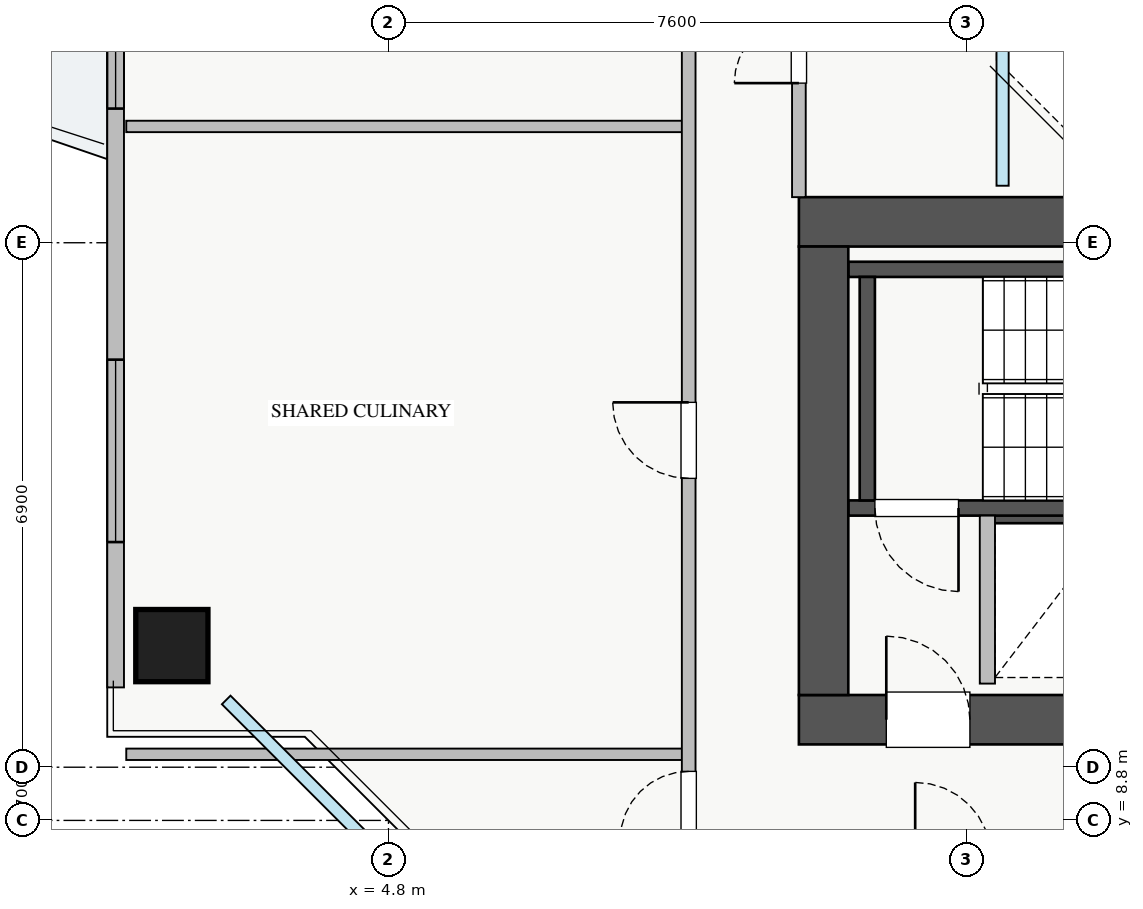
"""IFC4 building model, lengths in metres.
Left out: names, types, materials, properties, quantities, classifications, styles, units other than length and angle.
Written with IfcOpenShell. Run it as: python <this file> out.ifc"""

import sys

from ifc_helpers import new_model, si_unit, direction, frame, frame_2d, origin, origin_2d, place, context, subcontext, project, spatial, rectangle, extrude, source, transform, mapped, element, fill, save


model = new_model("IFC4")
c1 = context("Model", 3, precision=1e-05, world=origin(), true_north=direction((0.0, 1.0)))
c2 = subcontext(c1, "Body", "Model", "MODEL_VIEW")
j1 = project(units=[si_unit("LENGTHUNIT", "METRE"), si_unit("PLANEANGLEUNIT", "RADIAN")], contexts=[c1])
p1 = place(None, origin())
s1 = spatial("IfcSite", under=j1, at=p1, CompositionType="ELEMENT")
p2 = place(p1, origin())
s2 = spatial("IfcBuilding", under=s1, at=p2, CompositionType="ELEMENT")
p3 = place(p2, frame((0.0, 0.0, 143.75)))
s3 = spatial("IfcBuildingStorey", under=s2, at=p3, CompositionType="ELEMENT", Elevation=143.75)
p4 = place(p3, frame((12.68, 12.8, 0.0), z_axis=(0.0, 0.0, 1.0), x_axis=(1.0, 0.0, 0.0)))
e1 = element("IfcWall", 1, at=p4, inside=s3, PredefinedType="SHEAR", context=c2, shape_type="SweptSolid", body=[
    extrude(rectangle(XDim=1.94, YDim=0.18, at=frame_2d((0.97, 0.0))), origin(), (0.0, 0.0, 1.0), 3.07),
])
p5 = place(p3, frame((10.85, 12.91, 0.0), z_axis=(0.0, 0.0, 1.0), x_axis=(1.0, 0.0, 0.0)))
e2 = element("IfcWall", 2, at=p5, inside=s3, PredefinedType="SHEAR", context=c2, shape_type="SweptSolid", body=[
    extrude(rectangle(XDim=7.3, YDim=0.2, at=frame_2d((3.65, 0.0))), origin(), (0.0, 0.0, 1.0), 3.25),
])
p6 = place(p5, frame((0.35, 0.0, 0.0)))
e3 = element("IfcOpeningElement", 3, at=p6, cuts=e2, PredefinedType="OPENING", context=c2, shape_type="SweptSolid", body=[
    extrude(rectangle(XDim=1.1, YDim=2.05, at=frame_2d((0.55, 1.025))), frame((0.0, 0.11, 0.0), z_axis=(0.0, -1.0, 0.0), x_axis=(1.0, 0.0, 0.0)), (0.0, 0.0, 1.0), 0.22),
])
p7 = place(p3, frame((10.85, 16.05, 0.0), z_axis=(0.0, 0.0, 1.0), x_axis=(1.0, 0.0, 0.0)))
e4 = element("IfcWall", 4, at=p7, inside=s3, PredefinedType="SHEAR", context=c2, shape_type="SweptSolid", body=[
    extrude(rectangle(XDim=7.3, YDim=0.2, at=frame_2d((3.65, 0.0))), origin(), (0.0, 0.0, 1.0), 3.25),
])
p8 = place(p3, frame((11.1, 13.01, 0.0), z_axis=(0.0, 0.0, 1.0), x_axis=(0.0, 1.0, 0.0)))
e5 = element("IfcWall", 5, at=p8, inside=s3, PredefinedType="SHEAR", context=c2, shape_type="SweptSolid", body=[
    extrude(rectangle(XDim=2.94, YDim=0.2, at=frame_2d((1.47, 0.0))), origin(), (0.0, 0.0, 1.0), 3.25),
])
p9 = place(p3, frame((10.2, 10.125, 0.0), z_axis=(0.0, 0.0, 1.0), x_axis=(1.0, 0.0, 0.0)))
e6 = element("IfcWall", 6, at=p9, inside=s3, PredefinedType="SHEAR", context=c2, shape_type="SweptSolid", body=[
    extrude(rectangle(XDim=17.6, YDim=0.65, at=frame_2d((8.8, 0.0))), origin(), (0.0, 0.0, 1.0), 3.25),
])
p10 = place(p9, frame((1.15, 0.0, 0.0)))
e7 = element("IfcOpeningElement", 7, at=p10, cuts=e6, PredefinedType="OPENING", context=c2, shape_type="SweptSolid", body=[
    extrude(rectangle(XDim=1.1, YDim=2.05, at=frame_2d((0.55, 1.025))), frame((0.0, 0.335, 0.0), z_axis=(0.0, -1.0, 0.0), x_axis=(1.0, 0.0, 0.0)), (0.0, 0.0, 1.0), 0.67),
])
p11 = place(p9, frame((8.3, 0.0, 0.0)))
e8 = element("IfcOpeningElement", 8, at=p11, cuts=e6, PredefinedType="OPENING", context=c2, shape_type="SweptSolid", body=[
    extrude(rectangle(XDim=1.1, YDim=2.05, at=frame_2d((0.55, 1.025))), frame((0.0, 0.335, 0.0), z_axis=(0.0, -1.0, 0.0), x_axis=(1.0, 0.0, 0.0)), (0.0, 0.0, 1.0), 0.67),
])
p12 = place(p9, frame((4.9, 0.0, 0.0)))
e9 = element("IfcOpeningElement", 9, at=p12, cuts=e6, PredefinedType="OPENING", context=c2, shape_type="SweptSolid", body=[
    extrude(rectangle(XDim=1.1, YDim=2.05, at=frame_2d((0.55, 1.025))), frame((0.0, 0.335, 0.0), z_axis=(0.0, -1.0, 0.0), x_axis=(1.0, 0.0, 0.0)), (0.0, 0.0, 1.0), 0.67),
])
p13 = place(p9, frame((14.74, 0.0, 0.0)))
e10 = element("IfcOpeningElement", 10, at=p13, cuts=e6, PredefinedType="OPENING", context=c2, shape_type="SweptSolid", body=[
    extrude(rectangle(XDim=1.0, YDim=2.05, at=frame_2d((0.5, 1.025))), frame((0.0, 0.335, 0.0), z_axis=(0.0, -1.0, 0.0), x_axis=(1.0, 0.0, 0.0)), (0.0, 0.0, 1.0), 0.67),
])
p14 = place(p9, frame((10.155, 0.0, 0.0)))
e11 = element("IfcOpeningElement", 11, at=p14, cuts=e6, PredefinedType="OPENING", context=c2, shape_type="SweptSolid", body=[
    extrude(rectangle(XDim=1.0, YDim=2.05, at=frame_2d((0.5, 1.025))), frame((0.0, 0.335, 0.0), z_axis=(0.0, -1.0, 0.0), x_axis=(1.0, 0.0, 0.0)), (0.0, 0.0, 1.0), 0.67),
])
p15 = place(p9, frame((11.87, 0.0, 0.0)))
e12 = element("IfcOpeningElement", 12, at=p15, cuts=e6, PredefinedType="OPENING", context=c2, shape_type="SweptSolid", body=[
    extrude(rectangle(XDim=1.0, YDim=2.05, at=frame_2d((0.5, 1.025))), frame((0.0, 0.335, 0.0), z_axis=(0.0, -1.0, 0.0), x_axis=(1.0, 0.0, 0.0)), (0.0, 0.0, 1.0), 0.67),
])
p16 = place(p9, frame((13.46, 0.0, 0.0)))
e13 = element("IfcOpeningElement", 13, at=p16, cuts=e6, PredefinedType="OPENING", context=c2, shape_type="SweptSolid", body=[
    extrude(rectangle(XDim=1.0, YDim=2.05, at=frame_2d((0.5, 1.025))), frame((0.0, 0.335, 0.0), z_axis=(0.0, -1.0, 0.0), x_axis=(1.0, 0.0, 0.0)), (0.0, 0.0, 1.0), 0.67),
])
p17 = place(p3, frame((10.2, 16.675, 0.0), z_axis=(0.0, 0.0, 1.0), x_axis=(1.0, 0.0, 0.0)))
e14 = element("IfcWall", 14, at=p17, inside=s3, PredefinedType="SHEAR", context=c2, shape_type="SweptSolid", body=[
    extrude(rectangle(XDim=17.6, YDim=0.65, at=frame_2d((8.8, 0.0))), origin(), (0.0, 0.0, 1.0), 3.25),
])
p18 = place(p3, frame((10.525, 10.45, 0.0), z_axis=(0.0, 0.0, 1.0), x_axis=(0.0, 1.0, 0.0)))
e15 = element("IfcWall", 15, at=p18, inside=s3, PredefinedType="SHEAR", context=c2, shape_type="SweptSolid", body=[
    extrude(rectangle(XDim=5.9, YDim=0.65, at=frame_2d((2.95, 0.0))), origin(), (0.0, 0.0, 1.0), 3.25),
])
m1 = source(origin(), c2, "Body", "SweptSolid", [
    extrude(rectangle(XDim=0.95, YDim=0.95, at=origin_2d()), origin(), (0.0, 0.0, 1.0), 3.25),
])
p19 = place(p3, frame((1.95, 11.1, 0.0), z_axis=(0.0, 0.0, 1.0), x_axis=(1.0, 0.0, 0.0)))
e16 = element("IfcColumn", 16, at=p19, inside=s3, PredefinedType="COLUMN", context=c2, shape_type="MappedRepresentation", body=[
    mapped(m1, transform((0.0, 0.0, 0.0), x_axis=(1.0, 0.0, 0.0), y_axis=(0.0, 1.0, 0.0), z_axis=(0.0, 0.0, 1.0), scale=1.0)),
])
p20 = place(p3, frame((1.21, 10.55, 0.0), z_axis=(0.0, 0.0, 1.0), x_axis=(0.0, 1.0, 0.0)))
e17 = element("IfcWall", 17, at=p20, inside=s3, PredefinedType="STANDARD", context=c2, shape_type="SweptSolid", body=[
    extrude(rectangle(XDim=24.9, YDim=0.22, at=frame_2d((12.45, 0.0))), origin(), (0.0, 0.0, 1.0), 2.61),
])
p21 = place(p20, frame((13.3, 0.0, 0.0)))
e18 = element("IfcOpeningElement", 18, at=p21, cuts=e17, PredefinedType="OPENING", context=c2, shape_type="SweptSolid", body=[
    extrude(rectangle(XDim=1.2, YDim=2.1, at=frame_2d((0.6, 1.05))), frame((0.0, 0.12, 0.0), z_axis=(0.0, -1.0, 0.0), x_axis=(1.0, 0.0, 0.0)), (0.0, 0.0, 1.0), 0.24),
])
p22 = place(p20, frame((1.912, 0.0, 0.9)))
e19 = element("IfcOpeningElement", 19, at=p22, cuts=e17, PredefinedType="OPENING", context=c2, shape_type="SweptSolid", body=[
    extrude(rectangle(XDim=2.4, YDim=1.48, at=frame_2d((1.2, 0.74))), frame((0.0, 0.12, 0.0), z_axis=(0.0, -1.0, 0.0), x_axis=(1.0, 0.0, 0.0)), (0.0, 0.0, 1.0), 0.24),
])
p23 = place(p20, frame((21.82, 0.0, 0.9)))
e20 = element("IfcOpeningElement", 20, at=p23, cuts=e17, PredefinedType="OPENING", context=c2, shape_type="SweptSolid", body=[
    extrude(rectangle(XDim=2.1, YDim=1.5, at=frame_2d((1.05, 0.75))), frame((0.0, 0.12, 0.0), z_axis=(0.0, -1.0, 0.0), x_axis=(1.0, 0.0, 0.0)), (0.0, 0.0, 1.0), 0.24),
])
p24 = place(p20, frame((12.05, 0.0, 0.9)))
e21 = element("IfcOpeningElement", 21, at=p24, cuts=e17, PredefinedType="OPENING", context=c2, shape_type="SweptSolid", body=[
    extrude(rectangle(XDim=0.9, YDim=1.2, at=frame_2d((0.45, 0.6))), frame((0.0, 0.12, 0.0), z_axis=(0.0, -1.0, 0.0), x_axis=(1.0, 0.0, 0.0)), (0.0, 0.0, 1.0), 0.24),
])
p25 = place(p20, frame((7.615, 0.0, 0.9)))
e22 = element("IfcOpeningElement", 22, at=p25, cuts=e17, PredefinedType="OPENING", context=c2, shape_type="SweptSolid", body=[
    extrude(rectangle(XDim=0.9, YDim=1.2, at=frame_2d((0.45, 0.6))), frame((0.0, 0.12, 0.0), z_axis=(0.0, -1.0, 0.0), x_axis=(1.0, 0.0, 0.0)), (0.0, 0.0, 1.0), 0.24),
])
p26 = place(p20, frame((16.895, 0.0, 0.9)))
e23 = element("IfcOpeningElement", 23, at=p26, cuts=e17, PredefinedType="OPENING", context=c2, shape_type="SweptSolid", body=[
    extrude(rectangle(XDim=0.9, YDim=1.2, at=frame_2d((0.45, 0.6))), frame((0.0, 0.12, 0.0), z_axis=(0.0, -1.0, 0.0), x_axis=(1.0, 0.0, 0.0)), (0.0, 0.0, 1.0), 0.24),
])
p27 = place(p3, frame((12.68, 10.6, 0.0), z_axis=(0.0, 0.0, 1.0), x_axis=(0.0, 1.0, 0.0)))
e24 = element("IfcWall", 24, at=p27, inside=s3, PredefinedType="PARTITIONING", context=c2, shape_type="SweptSolid", body=[
    extrude(rectangle(XDim=2.21, YDim=0.2, at=frame_2d((1.105, 0.0))), origin(), (0.0, 0.0, 1.0), 3.07),
])
for number, where, z_axis, x_axis in (
    (25, (1.35, 9.67, 0.0), (0.0, 0.0, 1.0), (1.0, 0.0, 0.0)),
    (26, (1.35, 17.93, 0.0), (0.0, 0.0, 1.0), (1.0, 0.0, 0.0)),
):
    element("IfcWall", number, at=place(p3, frame(where, z_axis=z_axis, x_axis=x_axis)), inside=s3, PredefinedType="PARTITIONING", context=c2, shape_type="SweptSolid", body=[
        extrude(rectangle(XDim=7.4, YDim=0.15, at=frame_2d((3.7, 0.0))), origin(), (0.0, 0.0, 1.0), 3.07),
    ])
p28 = place(p3, frame((8.75, 8.3, 0.0), z_axis=(0.0, 0.0, 1.0), x_axis=(0.0, 1.0, 0.0)))
e27 = element("IfcWall", 27, at=p28, inside=s3, PredefinedType="PARTITIONING", context=c2, shape_type="SweptSolid", body=[
    extrude(rectangle(XDim=29.4, YDim=0.18, at=frame_2d((14.7, 0.0))), origin(), (0.0, 0.0, 1.0), 3.07),
])
p29 = place(p28, frame((28.08, 0.0, 0.0)))
e28 = element("IfcOpeningElement", 28, at=p29, cuts=e27, PredefinedType="OPENING", context=c2, shape_type="SweptSolid", body=[
    extrude(rectangle(XDim=0.9, YDim=2.05, at=frame_2d((0.45, 1.025))), frame((0.0, 0.1, 0.0), z_axis=(0.0, -1.0, 0.0), x_axis=(1.0, 0.0, 0.0)), (0.0, 0.0, 1.0), 0.2),
])
p30 = place(p28, frame((0.245, 0.0, 0.0)))
e29 = element("IfcOpeningElement", 29, at=p30, cuts=e27, PredefinedType="OPENING", context=c2, shape_type="SweptSolid", body=[
    extrude(rectangle(XDim=0.9, YDim=2.05, at=frame_2d((0.45, 1.025))), frame((0.0, 0.1, 0.0), z_axis=(0.0, -1.0, 0.0), x_axis=(1.0, 0.0, 0.0)), (0.0, 0.0, 1.0), 0.2),
])
p31 = place(p28, frame((5.0, 0.0, 0.0)))
e30 = element("IfcOpeningElement", 30, at=p31, cuts=e27, PredefinedType="OPENING", context=c2, shape_type="SweptSolid", body=[
    extrude(rectangle(XDim=1.0, YDim=2.05, at=frame_2d((0.5, 1.025))), frame((0.0, 0.1, 0.0), z_axis=(0.0, -1.0, 0.0), x_axis=(1.0, 0.0, 0.0)), (0.0, 0.0, 1.0), 0.2),
])
p32 = place(p28, frame((11.165, 0.0, 0.0)))
e31 = element("IfcOpeningElement", 31, at=p32, cuts=e27, PredefinedType="OPENING", context=c2, shape_type="SweptSolid", body=[
    extrude(rectangle(XDim=1.0, YDim=2.05, at=frame_2d((0.5, 1.025))), frame((0.0, 0.1, 0.0), z_axis=(0.0, -1.0, 0.0), x_axis=(1.0, 0.0, 0.0)), (0.0, 0.0, 1.0), 0.2),
])
p33 = place(p28, frame((20.325, 0.0, 0.0)))
e32 = element("IfcOpeningElement", 32, at=p33, cuts=e27, PredefinedType="OPENING", context=c2, shape_type="SweptSolid", body=[
    extrude(rectangle(XDim=1.0, YDim=2.05, at=frame_2d((0.5, 1.025))), frame((0.0, 0.1, 0.0), z_axis=(0.0, -1.0, 0.0), x_axis=(1.0, 0.0, 0.0)), (0.0, 0.0, 1.0), 0.2),
])
p34 = place(p3, frame((10.2, 17.0, 0.0), z_axis=(0.0, 0.0, 1.0), x_axis=(0.0, 1.0, 0.0)))
e33 = element("IfcWall", 33, at=p34, inside=s3, PredefinedType="PARTITIONING", context=c2, shape_type="SweptSolid", body=[
    extrude(rectangle(XDim=12.0, YDim=0.18, at=frame_2d((6.0, 0.0))), origin(), (0.0, 0.0, 1.0), 3.07),
])
p35 = place(p34, frame((1.5, 0.0, 0.0)))
e34 = element("IfcOpeningElement", 34, at=p35, cuts=e33, PredefinedType="OPENING", context=c2, shape_type="SweptSolid", body=[
    extrude(rectangle(XDim=0.85, YDim=2.05, at=frame_2d((0.425, 1.025))), frame((0.0, 0.1, 0.0), z_axis=(0.0, -1.0, 0.0), x_axis=(1.0, 0.0, 0.0)), (0.0, 0.0, 1.0), 0.2),
])
p36 = place(p34, frame((6.5, 0.0, 0.0)))
e35 = element("IfcOpeningElement", 35, at=p36, cuts=e33, PredefinedType="OPENING", context=c2, shape_type="SweptSolid", body=[
    extrude(rectangle(XDim=1.0, YDim=2.05, at=frame_2d((0.5, 1.025))), frame((0.0, 0.1, 0.0), z_axis=(0.0, -1.0, 0.0), x_axis=(1.0, 0.0, 0.0)), (0.0, 0.0, 1.0), 0.2),
])
m2 = source(origin(), c2, "Body", "SweptSolid", [
    extrude(rectangle(XDim=2.4, YDim=1.48, at=frame_2d((1.2, 0.74))), frame((0.0, 0.03, 0.0), z_axis=(0.0, -1.0, 0.0), x_axis=(1.0, 0.0, 0.0)), (0.0, 0.0, 1.0), 0.06),
])
p37 = place(p22, origin())
e36 = element("IfcWindow", 36, at=p37, inside=s3, PartitioningType="TRIPLE_PANEL_VERTICAL", PredefinedType="WINDOW", context=c2, shape_type="MappedRepresentation", body=[
    mapped(m2, transform((0.0, 0.0, 0.0), x_axis=(1.0, 0.0, 0.0), y_axis=(0.0, 1.0, 0.0), z_axis=(0.0, 0.0, 1.0), scale=1.0)),
])
fill(e19, e36)
m3 = source(origin(), c2, "Body", "SweptSolid", [
    extrude(rectangle(XDim=1.1, YDim=2.05, at=frame_2d((0.55, 1.025))), frame((0.0, 0.025, 0.0), z_axis=(0.0, -1.0, 0.0), x_axis=(1.0, 0.0, 0.0)), (0.0, 0.0, 1.0), 0.05),
])
p38 = place(p10, origin())
e37 = element("IfcDoor", 37, at=p38, inside=s3, OperationType="SINGLE_SWING_LEFT", PredefinedType="DOOR", context=c2, shape_type="MappedRepresentation", body=[
    mapped(m3, transform((0.0, 0.0, 0.0), x_axis=(1.0, 0.0, 0.0), y_axis=(0.0, 1.0, 0.0), z_axis=(0.0, 0.0, 1.0), scale=1.0)),
])
fill(e7, e37)
p39 = place(p6, frame((1.1, 0.0, 0.0), z_axis=(0.0, 0.0, 1.0), x_axis=(-1.0, 0.0, 0.0)))
e38 = element("IfcDoor", 38, at=p39, inside=s3, OperationType="SINGLE_SWING_RIGHT", PredefinedType="DOOR", context=c2, shape_type="MappedRepresentation", body=[
    mapped(m3, transform((0.0, 0.0, 0.0), x_axis=(1.0, 0.0, 0.0), y_axis=(0.0, 1.0, 0.0), z_axis=(0.0, 0.0, 1.0), scale=1.0)),
])
fill(e3, e38)
m4 = source(origin(), c2, "Body", "SweptSolid", [
    extrude(rectangle(XDim=0.9, YDim=2.05, at=frame_2d((0.45, 1.025))), frame((0.0, 0.025, 0.0), z_axis=(0.0, -1.0, 0.0), x_axis=(1.0, 0.0, 0.0)), (0.0, 0.0, 1.0), 0.05),
])
p40 = place(p30, origin())
e39 = element("IfcDoor", 39, at=p40, inside=s3, OperationType="SINGLE_SWING_LEFT", PredefinedType="DOOR", context=c2, shape_type="MappedRepresentation", body=[
    mapped(m4, transform((0.0, 0.0, 0.0), x_axis=(1.0, 0.0, 0.0), y_axis=(0.0, 1.0, 0.0), z_axis=(0.0, 0.0, 1.0), scale=1.0)),
])
fill(e29, e39)
m5 = source(origin(), c2, "Body", "SweptSolid", [
    extrude(rectangle(XDim=1.0, YDim=2.05, at=frame_2d((0.5, 1.025))), frame((0.0, 0.025, 0.0), z_axis=(0.0, -1.0, 0.0), x_axis=(1.0, 0.0, 0.0)), (0.0, 0.0, 1.0), 0.05),
])
p41 = place(p31, origin())
e40 = element("IfcDoor", 40, at=p41, inside=s3, OperationType="SINGLE_SWING_RIGHT", PredefinedType="DOOR", context=c2, shape_type="MappedRepresentation", body=[
    mapped(m5, transform((0.0, 0.0, 0.0), x_axis=(1.0, 0.0, 0.0), y_axis=(0.0, 1.0, 0.0), z_axis=(0.0, 0.0, 1.0), scale=1.0)),
])
fill(e30, e40)
m6 = source(origin(), c2, "Body", "SweptSolid", [
    extrude(rectangle(XDim=0.85, YDim=2.05, at=frame_2d((0.425, 1.025))), frame((0.0, 0.025, 0.0), z_axis=(0.0, -1.0, 0.0), x_axis=(1.0, 0.0, 0.0)), (0.0, 0.0, 1.0), 0.05),
])
p42 = place(p35, origin())
e41 = element("IfcDoor", 41, at=p42, inside=s3, OperationType="SINGLE_SWING_LEFT", PredefinedType="DOOR", context=c2, shape_type="MappedRepresentation", body=[
    mapped(m6, transform((0.0, 0.0, 0.0), x_axis=(1.0, 0.0, 0.0), y_axis=(0.0, 1.0, 0.0), z_axis=(0.0, 0.0, 1.0), scale=1.0)),
])
fill(e34, e41)
m7 = source(origin(), c2, "Body", "SweptSolid", [
    extrude(rectangle(XDim=0.9, YDim=1.2, at=frame_2d((0.45, 0.6))), frame((0.0, 0.03, 0.0), z_axis=(0.0, -1.0, 0.0), x_axis=(1.0, 0.0, 0.0)), (0.0, 0.0, 1.0), 0.06),
])
p43 = place(p25, origin())
e42 = element("IfcWindow", 42, at=p43, inside=s3, PartitioningType="SINGLE_PANEL", PredefinedType="WINDOW", context=c2, shape_type="MappedRepresentation", body=[
    mapped(m7, transform((0.0, 0.0, 0.0), x_axis=(1.0, 0.0, 0.0), y_axis=(0.0, 1.0, 0.0), z_axis=(0.0, 0.0, 1.0), scale=1.0)),
])
fill(e22, e42)
save(model, sys.argv[1])
